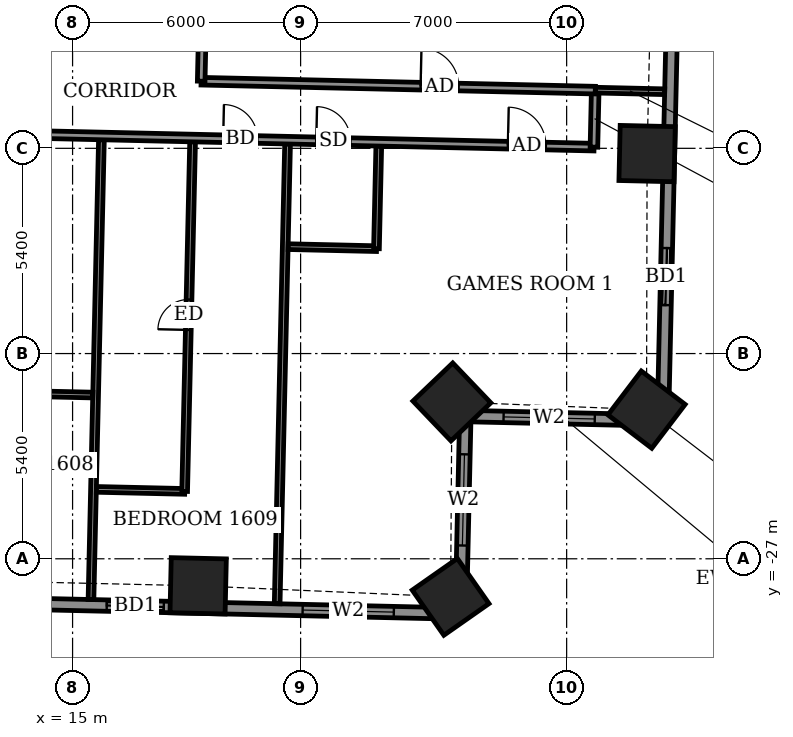
"""IFC4 building model, lengths in metres.
Left out: names, types, materials, properties, quantities, classifications, styles, units other than length and angle.
Written with IfcOpenShell. Run it as: python <this file> out.ifc"""

import sys

from ifc_helpers import new_model, si_unit, direction, frame, frame_2d, origin, origin_2d, place, context, subcontext, project, spatial, rectangle, extrude, element, fill, save


model = new_model("IFC4")
c1 = context("Model", 3, precision=1e-05, world=origin(), true_north=direction((0.0, 1.0)))
c2 = subcontext(c1, "Body", "Model", "MODEL_VIEW")
j1 = project(units=[si_unit("LENGTHUNIT", "METRE"), si_unit("PLANEANGLEUNIT", "RADIAN")], contexts=[c1])
p1 = place(None, origin())
s1 = spatial("IfcSite", under=j1, at=p1, CompositionType="ELEMENT")
p2 = place(p1, origin())
s2 = spatial("IfcBuilding", under=s1, at=p2, CompositionType="ELEMENT")
p3 = place(p2, frame((0.0, 0.0, 67.5)))
s3 = spatial("IfcBuildingStorey", under=s2, at=p3, CompositionType="ELEMENT", Elevation=67.5)
for number, where, z_axis, x_axis in (
    (1, (18.304, -27.711, -0.55), (0.0, 0.0, 1.0), (1.0, -0.023, 0.0)),
    (2, (24.947, -28.002, -0.55), (0.0, 0.0, 1.0), (0.819, 0.574, 0.0)),
    (3, (24.98, -22.873, -0.55), (0.0, 0.0, 1.0), (0.723, 0.691, 0.0)),
    (4, (30.102, -23.076, -0.55), (0.0, 0.0, 1.0), (0.606, 0.796, 0.0)),
    (5, (30.117, -16.339, -0.55), (0.0, 0.0, 1.0), (0.023, 1.0, 0.0)),
):
    element("IfcColumn", number, at=place(p3, frame(where, z_axis=z_axis, x_axis=x_axis)), inside=s3, PredefinedType="COLUMN", context=c2, shape_type="SweptSolid", body=[
        extrude(rectangle(XDim=1.45, YDim=1.45, at=origin_2d()), origin(), (0.0, 0.0, 1.0), 3.6),
    ])
p4 = place(p3, frame((30.533, -23.362, 0.0), z_axis=(0.0, 0.0, 1.0), x_axis=(0.022698800888, 0.999742349027, 0.0)))
e6 = element("IfcWall", 6, at=p4, inside=s3, PredefinedType="SOLIDWALL", context=c2, shape_type="SweptSolid", body=[
    extrude(rectangle(XDim=14.23, YDim=0.3, at=frame_2d((7.115, 0.0))), origin(), (0.0, 0.0, 1.0), 3.05),
])
p5 = place(p4, frame((3.038, 0.0, 0.0)))
e7 = element("IfcOpeningElement", 7, at=p5, cuts=e6, PredefinedType="OPENING", context=c2, shape_type="SweptSolid", body=[
    extrude(rectangle(XDim=1.5, YDim=2.4, at=frame_2d((0.75, 1.2))), frame((0.0, 0.16, 0.0), z_axis=(0.0, -1.0, 0.0), x_axis=(1.0, 0.0, 0.0)), (0.0, 0.0, 1.0), 0.32),
])
p6 = place(p4, frame((9.95, 0.0, 0.9)))
e8 = element("IfcOpeningElement", 8, at=p6, cuts=e6, PredefinedType="OPENING", context=c2, shape_type="SweptSolid", body=[
    extrude(rectangle(XDim=2.4, YDim=1.5, at=frame_2d((1.2, 0.75))), frame((0.0, 0.16, 0.0), z_axis=(0.0, -1.0, 0.0), x_axis=(1.0, 0.0, 0.0)), (0.0, 0.0, 1.0), 0.32),
])
p7 = place(p3, frame((-24.007, -27.326, 0.0), z_axis=(0.0, 0.0, 1.0), x_axis=(0.999742536491, -0.022690542744, 0.0)))
e9 = element("IfcWall", 9, at=p7, inside=s3, PredefinedType="SOLIDWALL", context=c2, shape_type="SweptSolid", body=[
    extrude(rectangle(XDim=49.236, YDim=0.3, at=frame_2d((24.618, 0.0))), origin(), (0.0, 0.0, 1.0), 3.05),
])
p8 = place(p7, frame((1.391, 0.0, 0.0)))
e10 = element("IfcOpeningElement", 10, at=p8, cuts=e9, PredefinedType="OPENING", context=c2, shape_type="SweptSolid", body=[
    extrude(rectangle(XDim=1.2, YDim=2.4, at=frame_2d((0.6, 1.2))), frame((0.0, 0.16, 0.0), z_axis=(0.0, -1.0, 0.0), x_axis=(1.0, 0.0, 0.0)), (0.0, 0.0, 1.0), 0.32),
])
p9 = place(p7, frame((3.901, 0.0, 0.0)))
e11 = element("IfcOpeningElement", 11, at=p9, cuts=e9, PredefinedType="OPENING", context=c2, shape_type="SweptSolid", body=[
    extrude(rectangle(XDim=1.5, YDim=2.4, at=frame_2d((0.75, 1.2))), frame((0.0, 0.16, 0.0), z_axis=(0.0, -1.0, 0.0), x_axis=(1.0, 0.0, 0.0)), (0.0, 0.0, 1.0), 0.32),
])
p10 = place(p7, frame((9.1, 0.0, 0.0)))
e12 = element("IfcOpeningElement", 12, at=p10, cuts=e9, PredefinedType="OPENING", context=c2, shape_type="SweptSolid", body=[
    extrude(rectangle(XDim=1.5, YDim=2.4, at=frame_2d((0.75, 1.2))), frame((0.0, 0.16, 0.0), z_axis=(0.0, -1.0, 0.0), x_axis=(1.0, 0.0, 0.0)), (0.0, 0.0, 1.0), 0.32),
])
p11 = place(p7, frame((14.889, 0.0, 0.0)))
e13 = element("IfcOpeningElement", 13, at=p11, cuts=e9, PredefinedType="OPENING", context=c2, shape_type="SweptSolid", body=[
    extrude(rectangle(XDim=1.5, YDim=2.4, at=frame_2d((0.75, 1.2))), frame((0.0, 0.16, 0.0), z_axis=(0.0, -1.0, 0.0), x_axis=(1.0, 0.0, 0.0)), (0.0, 0.0, 1.0), 0.32),
])
p12 = place(p7, frame((17.952, 0.0, 0.0)))
e14 = element("IfcOpeningElement", 14, at=p12, cuts=e9, PredefinedType="OPENING", context=c2, shape_type="SweptSolid", body=[
    extrude(rectangle(XDim=1.5, YDim=2.4, at=frame_2d((0.75, 1.2))), frame((0.0, 0.16, 0.0), z_axis=(0.0, -1.0, 0.0), x_axis=(1.0, 0.0, 0.0)), (0.0, 0.0, 1.0), 0.32),
])
p13 = place(p7, frame((22.878, 0.0, 0.0)))
e15 = element("IfcOpeningElement", 15, at=p13, cuts=e9, PredefinedType="OPENING", context=c2, shape_type="SweptSolid", body=[
    extrude(rectangle(XDim=1.5, YDim=2.4, at=frame_2d((0.75, 1.2))), frame((0.0, 0.16, 0.0), z_axis=(0.0, -1.0, 0.0), x_axis=(1.0, 0.0, 0.0)), (0.0, 0.0, 1.0), 0.32),
])
p14 = place(p7, frame((26.091, 0.0, 0.0)))
e16 = element("IfcOpeningElement", 16, at=p14, cuts=e9, PredefinedType="OPENING", context=c2, shape_type="SweptSolid", body=[
    extrude(rectangle(XDim=1.2, YDim=2.4, at=frame_2d((0.6, 1.2))), frame((0.0, 0.16, 0.0), z_axis=(0.0, -1.0, 0.0), x_axis=(1.0, 0.0, 0.0)), (0.0, 0.0, 1.0), 0.32),
])
p15 = place(p7, frame((31.754, 0.0, 0.0)))
e17 = element("IfcOpeningElement", 17, at=p15, cuts=e9, PredefinedType="OPENING", context=c2, shape_type="SweptSolid", body=[
    extrude(rectangle(XDim=1.5, YDim=2.4, at=frame_2d((0.75, 1.2))), frame((0.0, 0.16, 0.0), z_axis=(0.0, -1.0, 0.0), x_axis=(1.0, 0.0, 0.0)), (0.0, 0.0, 1.0), 0.32),
])
p16 = place(p7, frame((36.854, 0.0, 0.0)))
e18 = element("IfcOpeningElement", 18, at=p16, cuts=e9, PredefinedType="OPENING", context=c2, shape_type="SweptSolid", body=[
    extrude(rectangle(XDim=1.5, YDim=2.4, at=frame_2d((0.75, 1.2))), frame((0.0, 0.16, 0.0), z_axis=(0.0, -1.0, 0.0), x_axis=(1.0, 0.0, 0.0)), (0.0, 0.0, 1.0), 0.32),
])
p17 = place(p7, frame((39.917, 0.0, 0.0)))
e19 = element("IfcOpeningElement", 19, at=p17, cuts=e9, PredefinedType="OPENING", context=c2, shape_type="SweptSolid", body=[
    extrude(rectangle(XDim=1.5, YDim=2.4, at=frame_2d((0.75, 1.2))), frame((0.0, 0.16, 0.0), z_axis=(0.0, -1.0, 0.0), x_axis=(1.0, 0.0, 0.0)), (0.0, 0.0, 1.0), 0.32),
])
p18 = place(p7, frame((45.072, 0.0, 0.9)))
e20 = element("IfcOpeningElement", 20, at=p18, cuts=e9, PredefinedType="OPENING", context=c2, shape_type="SweptSolid", body=[
    extrude(rectangle(XDim=2.4, YDim=1.5, at=frame_2d((1.2, 0.75))), frame((0.0, 0.16, 0.0), z_axis=(0.0, -1.0, 0.0), x_axis=(1.0, 0.0, 0.0)), (0.0, 0.0, 1.0), 0.32),
])
p19 = place(p3, frame((25.216, -28.443, 0.0), z_axis=(0.0, 0.0, 1.0), x_axis=(0.022674484462, 0.999742900827, 0.0)))
e21 = element("IfcWall", 21, at=p19, inside=s3, PredefinedType="SOLIDWALL", context=c2, shape_type="SweptSolid", body=[
    extrude(rectangle(XDim=5.2, YDim=0.3, at=frame_2d((2.6, 0.0))), origin(), (0.0, 0.0, 1.0), 2.55),
])
p20 = place(p19, frame((1.793, 0.0, 0.9)))
e22 = element("IfcOpeningElement", 22, at=p20, cuts=e21, PredefinedType="OPENING", context=c2, shape_type="SweptSolid", body=[
    extrude(rectangle(XDim=2.4, YDim=1.5, at=frame_2d((1.2, 0.75))), frame((0.0, 0.16, 0.0), z_axis=(0.0, -1.0, 0.0), x_axis=(1.0, 0.0, 0.0)), (0.0, 0.0, 1.0), 0.32),
])
p21 = place(p3, frame((25.334, -23.244, 0.0), z_axis=(0.0, 0.0, 1.0), x_axis=(0.999741811307, -0.022722471786, 0.0)))
e23 = element("IfcWall", 23, at=p21, inside=s3, PredefinedType="SOLIDWALL", context=c2, shape_type="SweptSolid", body=[
    extrude(rectangle(XDim=5.2, YDim=0.3, at=frame_2d((2.6, 0.0))), origin(), (0.0, 0.0, 1.0), 2.55),
])
p22 = place(p21, frame((1.007, 0.0, 0.9)))
e24 = element("IfcOpeningElement", 24, at=p22, cuts=e23, PredefinedType="OPENING", context=c2, shape_type="SweptSolid", body=[
    extrude(rectangle(XDim=2.4, YDim=1.5, at=frame_2d((1.2, 0.75))), frame((0.0, 0.16, 0.0), z_axis=(0.0, -1.0, 0.0), x_axis=(1.0, 0.0, 0.0)), (0.0, 0.0, 1.0), 0.32),
])
p23 = place(p3, frame((15.484, -28.072, 0.0), z_axis=(0.0, 0.0, 1.0), x_axis=(0.02273928012, 0.99974142914, 0.0)))
e25 = element("IfcWall", 25, at=p23, inside=s3, PredefinedType="PARTITIONING", context=c2, shape_type="SweptSolid", body=[
    extrude(rectangle(XDim=12.1, YDim=0.15, at=frame_2d((6.05, 0.0))), origin(), (0.0, 0.0, 1.0), 2.55),
])
p24 = place(p3, frame((20.383, -28.183, 0.0), z_axis=(0.0, 0.0, 1.0), x_axis=(0.022637991173, 0.99974372784, 0.0)))
e26 = element("IfcWall", 26, at=p24, inside=s3, PredefinedType="PARTITIONING", context=c2, shape_type="SweptSolid", body=[
    extrude(rectangle(XDim=12.1, YDim=0.15, at=frame_2d((6.05, 0.0))), origin(), (0.0, 0.0, 1.0), 2.55),
])
p25 = place(p3, frame((15.627, -25.174, 0.0), z_axis=(0.0, 0.0, 1.0), x_axis=(0.999740260747, -0.02279059109, 0.0)))
e27 = element("IfcWall", 27, at=p25, inside=s3, PredefinedType="PARTITIONING", context=c2, shape_type="SweptSolid", body=[
    extrude(rectangle(XDim=2.324, YDim=0.15, at=frame_2d((1.162, 0.0))), origin(), (0.0, 0.0, 1.0), 3.05),
])
p26 = place(p3, frame((17.949, -25.227, 0.0), z_axis=(0.0, 0.0, 1.0), x_axis=(0.02271477479, 0.999741986218, 0.0)))
e28 = element("IfcWall", 28, at=p26, inside=s3, PredefinedType="PARTITIONING", context=c2, shape_type="SweptSolid", body=[
    extrude(rectangle(XDim=9.2, YDim=0.15, at=frame_2d((4.6, 0.0))), origin(), (0.0, 0.0, 1.0), 3.05),
])
p27 = place(p26, frame((4.25, 0.0, 0.0)))
e29 = element("IfcOpeningElement", 29, at=p27, cuts=e28, PredefinedType="OPENING", context=c2, shape_type="SweptSolid", body=[
    extrude(rectangle(XDim=0.8, YDim=2.1, at=frame_2d((0.4, 1.05))), frame((0.0, 0.085, 0.0), z_axis=(0.0, -1.0, 0.0), x_axis=(1.0, 0.0, 0.0)), (0.0, 0.0, 1.0), 0.17),
])
p28 = place(p3, frame((13.209, -22.639, 0.0), z_axis=(0.0, 0.0, 1.0), x_axis=(0.999740260747, -0.02279059109, 0.0)))
e30 = element("IfcWall", 30, at=p28, inside=s3, PredefinedType="PARTITIONING", context=c2, shape_type="SweptSolid", body=[
    extrude(rectangle(XDim=2.324, YDim=0.15, at=frame_2d((1.162, 0.0))), origin(), (0.0, 0.0, 1.0), 3.05),
])
p29 = place(p3, frame((20.673, -18.787, 0.0), z_axis=(0.0, 0.0, 1.0), x_axis=(0.999740478815, -0.022781023197, 0.0)))
e31 = element("IfcWall", 31, at=p29, inside=s3, PredefinedType="PARTITIONING", context=c2, shape_type="SweptSolid", body=[
    extrude(rectangle(XDim=2.325, YDim=0.15, at=frame_2d((1.163, 0.0))), origin(), (0.0, 0.0, 1.0), 3.05),
])
p30 = place(p3, frame((22.996, -18.84, 0.0), z_axis=(0.0, 0.0, 1.0), x_axis=(0.022518033722, 0.999746436932, 0.0)))
e32 = element("IfcWall", 32, at=p30, inside=s3, PredefinedType="PARTITIONING", context=c2, shape_type="SweptSolid", body=[
    extrude(rectangle(XDim=2.7, YDim=0.15, at=frame_2d((1.35, 0.0))), origin(), (0.0, 0.0, 1.0), 3.05),
])
p31 = place(p3, frame((-26.151, -14.924, 0.0), z_axis=(0.0, 0.0, 1.0), x_axis=(0.999742750999, -0.022681089575, 0.0)))
e33 = element("IfcWall", 33, at=p31, inside=s3, PredefinedType="PARTITIONING", context=c2, shape_type="SweptSolid", body=[
    extrude(rectangle(XDim=54.886, YDim=0.2, at=frame_2d((27.443, 0.0))), origin(), (0.0, 0.0, 1.0), 3.05),
])
p32 = place(p31, frame((1.345, 0.0, 0.0)))
e34 = element("IfcOpeningElement", 34, at=p32, cuts=e33, PredefinedType="OPENING", context=c2, shape_type="SweptSolid", body=[
    extrude(rectangle(XDim=1.0, YDim=2.1, at=frame_2d((0.5, 1.05))), frame((0.0, 0.11, 0.0), z_axis=(0.0, -1.0, 0.0), x_axis=(1.0, 0.0, 0.0)), (0.0, 0.0, 1.0), 0.22),
])
p33 = place(p31, frame((8.35, 0.0, 0.0)))
e35 = element("IfcOpeningElement", 35, at=p33, cuts=e33, PredefinedType="OPENING", context=c2, shape_type="SweptSolid", body=[
    extrude(rectangle(XDim=0.9, YDim=2.1, at=frame_2d((0.45, 1.05))), frame((0.0, 0.11, 0.0), z_axis=(0.0, -1.0, 0.0), x_axis=(1.0, 0.0, 0.0)), (0.0, 0.0, 1.0), 0.22),
])
p34 = place(p31, frame((10.625, 0.0, 0.0)))
e36 = element("IfcOpeningElement", 36, at=p34, cuts=e33, PredefinedType="OPENING", context=c2, shape_type="SweptSolid", body=[
    extrude(rectangle(XDim=0.9, YDim=2.1, at=frame_2d((0.45, 1.05))), frame((0.0, 0.11, 0.0), z_axis=(0.0, -1.0, 0.0), x_axis=(1.0, 0.0, 0.0)), (0.0, 0.0, 1.0), 0.22),
])
p35 = place(p31, frame((17.675, 0.0, 0.0)))
e37 = element("IfcOpeningElement", 37, at=p35, cuts=e33, PredefinedType="OPENING", context=c2, shape_type="SweptSolid", body=[
    extrude(rectangle(XDim=0.9, YDim=2.1, at=frame_2d((0.45, 1.05))), frame((0.0, 0.11, 0.0), z_axis=(0.0, -1.0, 0.0), x_axis=(1.0, 0.0, 0.0)), (0.0, 0.0, 1.0), 0.22),
])
p36 = place(p31, frame((19.725, 0.0, 0.0)))
e38 = element("IfcOpeningElement", 38, at=p36, cuts=e33, PredefinedType="OPENING", context=c2, shape_type="SweptSolid", body=[
    extrude(rectangle(XDim=0.9, YDim=2.1, at=frame_2d((0.45, 1.05))), frame((0.0, 0.11, 0.0), z_axis=(0.0, -1.0, 0.0), x_axis=(1.0, 0.0, 0.0)), (0.0, 0.0, 1.0), 0.22),
])
p37 = place(p31, frame((26.575, 0.0, 0.0)))
e39 = element("IfcOpeningElement", 39, at=p37, cuts=e33, PredefinedType="OPENING", context=c2, shape_type="SweptSolid", body=[
    extrude(rectangle(XDim=0.9, YDim=2.1, at=frame_2d((0.45, 1.05))), frame((0.0, 0.11, 0.0), z_axis=(0.0, -1.0, 0.0), x_axis=(1.0, 0.0, 0.0)), (0.0, 0.0, 1.0), 0.22),
])
p38 = place(p31, frame((28.75, 0.0, 0.0)))
e40 = element("IfcOpeningElement", 40, at=p38, cuts=e33, PredefinedType="OPENING", context=c2, shape_type="SweptSolid", body=[
    extrude(rectangle(XDim=0.9, YDim=2.1, at=frame_2d((0.45, 1.05))), frame((0.0, 0.11, 0.0), z_axis=(0.0, -1.0, 0.0), x_axis=(1.0, 0.0, 0.0)), (0.0, 0.0, 1.0), 0.22),
])
p39 = place(p31, frame((35.875, 0.0, 0.0)))
e41 = element("IfcOpeningElement", 41, at=p39, cuts=e33, PredefinedType="OPENING", context=c2, shape_type="SweptSolid", body=[
    extrude(rectangle(XDim=0.9, YDim=2.1, at=frame_2d((0.45, 1.05))), frame((0.0, 0.11, 0.0), z_axis=(0.0, -1.0, 0.0), x_axis=(1.0, 0.0, 0.0)), (0.0, 0.0, 1.0), 0.22),
])
p40 = place(p31, frame((38.1, 0.0, 0.0)))
e42 = element("IfcOpeningElement", 42, at=p40, cuts=e33, PredefinedType="OPENING", context=c2, shape_type="SweptSolid", body=[
    extrude(rectangle(XDim=0.9, YDim=2.1, at=frame_2d((0.45, 1.05))), frame((0.0, 0.11, 0.0), z_axis=(0.0, -1.0, 0.0), x_axis=(1.0, 0.0, 0.0)), (0.0, 0.0, 1.0), 0.22),
])
p41 = place(p31, frame((45.125, 0.0, 0.0)))
e43 = element("IfcOpeningElement", 43, at=p41, cuts=e33, PredefinedType="OPENING", context=c2, shape_type="SweptSolid", body=[
    extrude(rectangle(XDim=0.9, YDim=2.1, at=frame_2d((0.45, 1.05))), frame((0.0, 0.11, 0.0), z_axis=(0.0, -1.0, 0.0), x_axis=(1.0, 0.0, 0.0)), (0.0, 0.0, 1.0), 0.22),
])
p42 = place(p31, frame((52.618, 0.0, 0.0)))
e44 = element("IfcOpeningElement", 44, at=p42, cuts=e33, PredefinedType="OPENING", context=c2, shape_type="SweptSolid", body=[
    extrude(rectangle(XDim=1.0, YDim=2.1, at=frame_2d((0.5, 1.05))), frame((0.0, 0.11, 0.0), z_axis=(0.0, -1.0, 0.0), x_axis=(1.0, 0.0, 0.0)), (0.0, 0.0, 1.0), 0.22),
])
p43 = place(p31, frame((47.575, 0.0, 0.0)))
e45 = element("IfcOpeningElement", 45, at=p43, cuts=e33, PredefinedType="OPENING", context=c2, shape_type="SweptSolid", body=[
    extrude(rectangle(XDim=0.9, YDim=2.1, at=frame_2d((0.45, 1.05))), frame((0.0, 0.11, 0.0), z_axis=(0.0, -1.0, 0.0), x_axis=(1.0, 0.0, 0.0)), (0.0, 0.0, 1.0), 0.22),
])
p44 = place(p3, frame((28.718, -16.169, 0.0), z_axis=(0.0, 0.0, 1.0), x_axis=(0.022617910375, 0.999744182344, 0.0)))
e46 = element("IfcWall", 46, at=p44, inside=s3, PredefinedType="PARTITIONING", context=c2, shape_type="SweptSolid", body=[
    extrude(rectangle(XDim=1.5, YDim=0.2, at=frame_2d((0.75, 0.0))), origin(), (0.0, 0.0, 1.0), 3.05),
])
p45 = place(p3, frame((18.382, -14.434, 0.0), z_axis=(0.0, 0.0, 1.0), x_axis=(0.999743763457, -0.022636418209, 0.0)))
e47 = element("IfcWall", 47, at=p45, inside=s3, PredefinedType="PARTITIONING", context=c2, shape_type="SweptSolid", body=[
    extrude(rectangle(XDim=10.375, YDim=0.2, at=frame_2d((5.188, 0.0))), origin(), (0.0, 0.0, 1.0), 3.05),
])
p46 = place(p45, frame((5.777, 0.0, 0.0)))
e48 = element("IfcOpeningElement", 48, at=p46, cuts=e47, PredefinedType="OPENING", context=c2, shape_type="SweptSolid", body=[
    extrude(rectangle(XDim=1.0, YDim=2.1, at=frame_2d((0.5, 1.05))), frame((0.0, 0.11, 0.0), z_axis=(0.0, -1.0, 0.0), x_axis=(1.0, 0.0, 0.0)), (0.0, 0.0, 1.0), 0.22),
])
p47 = place(p3, frame((18.384, -14.434, 0.0), z_axis=(0.0, 0.0, 1.0), x_axis=(0.022773383809, 0.999740652864, 0.0)))
e49 = element("IfcWall", 49, at=p47, inside=s3, PredefinedType="PARTITIONING", context=c2, shape_type="SweptSolid", body=[
    extrude(rectangle(XDim=6.722, YDim=0.2, at=frame_2d((3.361, 0.0))), origin(), (0.0, 0.0, 1.0), 3.05),
])
p48 = place(p3, frame((28.755, -14.669, 0.0), z_axis=(0.0, 0.0, 1.0), x_axis=(0.999735161806, -0.023013175566, 0.0)))
e50 = element("IfcWall", 50, at=p48, inside=s3, PredefinedType="PARTITIONING", context=c2, shape_type="SweptSolid", body=[
    extrude(rectangle(XDim=1.825, YDim=0.15, at=frame_2d((0.912, 0.0))), origin(), (0.0, 0.0, 1.0), 2.55),
])
p49 = place(p5, origin())
e51 = element("IfcDoor", 51, at=p49, inside=s3, OperationType="SLIDING_TO_LEFT", PredefinedType="DOOR", context=c2, shape_type="SweptSolid", body=[
    extrude(rectangle(XDim=1.5, YDim=2.4, at=frame_2d((0.75, 1.2))), frame((0.0, 0.025, 0.0), z_axis=(0.0, -1.0, 0.0), x_axis=(1.0, 0.0, 0.0)), (0.0, 0.0, 1.0), 0.05),
])
fill(e7, e51)
p50 = place(p17, origin())
e52 = element("IfcDoor", 52, at=p50, inside=s3, OperationType="SLIDING_TO_LEFT", PredefinedType="DOOR", context=c2, shape_type="SweptSolid", body=[
    extrude(rectangle(XDim=1.5, YDim=2.4, at=frame_2d((0.75, 1.2))), frame((0.0, 0.025, 0.0), z_axis=(0.0, -1.0, 0.0), x_axis=(1.0, 0.0, 0.0)), (0.0, 0.0, 1.0), 0.05),
])
fill(e19, e52)
p51 = place(p18, origin())
e53 = element("IfcWindow", 53, at=p51, inside=s3, PartitioningType="DOUBLE_PANEL_VERTICAL", PredefinedType="WINDOW", context=c2, shape_type="SweptSolid", body=[
    extrude(rectangle(XDim=2.4, YDim=1.5, at=frame_2d((1.2, 0.75))), frame((0.0, 0.03, 0.0), z_axis=(0.0, -1.0, 0.0), x_axis=(1.0, 0.0, 0.0)), (0.0, 0.0, 1.0), 0.06),
])
fill(e20, e53)
p52 = place(p20, origin())
e54 = element("IfcWindow", 54, at=p52, inside=s3, PartitioningType="DOUBLE_PANEL_VERTICAL", PredefinedType="WINDOW", context=c2, shape_type="SweptSolid", body=[
    extrude(rectangle(XDim=2.4, YDim=1.5, at=frame_2d((1.2, 0.75))), frame((0.0, 0.03, 0.0), z_axis=(0.0, -1.0, 0.0), x_axis=(1.0, 0.0, 0.0)), (0.0, 0.0, 1.0), 0.06),
])
fill(e22, e54)
p53 = place(p22, origin())
e55 = element("IfcWindow", 55, at=p53, inside=s3, PartitioningType="DOUBLE_PANEL_VERTICAL", PredefinedType="WINDOW", context=c2, shape_type="SweptSolid", body=[
    extrude(rectangle(XDim=2.4, YDim=1.5, at=frame_2d((1.2, 0.75))), frame((0.0, 0.03, 0.0), z_axis=(0.0, -1.0, 0.0), x_axis=(1.0, 0.0, 0.0)), (0.0, 0.0, 1.0), 0.06),
])
fill(e24, e55)
p54 = place(p41, origin())
e56 = element("IfcDoor", 56, at=p54, inside=s3, OperationType="SINGLE_SWING_LEFT", PredefinedType="DOOR", context=c2, shape_type="SweptSolid", body=[
    extrude(rectangle(XDim=0.9, YDim=2.1, at=frame_2d((0.45, 1.05))), frame((0.0, 0.025, 0.0), z_axis=(0.0, -1.0, 0.0), x_axis=(1.0, 0.0, 0.0)), (0.0, 0.0, 1.0), 0.05),
])
fill(e43, e56)
p55 = place(p27, origin())
e57 = element("IfcDoor", 57, at=p55, inside=s3, OperationType="SINGLE_SWING_LEFT", PredefinedType="DOOR", context=c2, shape_type="SweptSolid", body=[
    extrude(rectangle(XDim=0.8, YDim=2.1, at=frame_2d((0.4, 1.05))), frame((0.0, 0.025, 0.0), z_axis=(0.0, -1.0, 0.0), x_axis=(1.0, 0.0, 0.0)), (0.0, 0.0, 1.0), 0.05),
])
fill(e29, e57)
p56 = place(p42, origin())
e58 = element("IfcDoor", 58, at=p56, inside=s3, OperationType="SINGLE_SWING_RIGHT", PredefinedType="DOOR", context=c2, shape_type="SweptSolid", body=[
    extrude(rectangle(XDim=1.0, YDim=2.1, at=frame_2d((0.5, 1.05))), frame((0.0, 0.025, 0.0), z_axis=(0.0, -1.0, 0.0), x_axis=(1.0, 0.0, 0.0)), (0.0, 0.0, 1.0), 0.05),
])
fill(e44, e58)
p57 = place(p43, origin())
e59 = element("IfcDoor", 59, at=p57, inside=s3, OperationType="SINGLE_SWING_LEFT", PredefinedType="DOOR", context=c2, shape_type="SweptSolid", body=[
    extrude(rectangle(XDim=0.9, YDim=2.1, at=frame_2d((0.45, 1.05))), frame((0.0, 0.025, 0.0), z_axis=(0.0, -1.0, 0.0), x_axis=(1.0, 0.0, 0.0)), (0.0, 0.0, 1.0), 0.05),
])
fill(e45, e59)
p58 = place(p46, origin())
e60 = element("IfcDoor", 60, at=p58, inside=s3, OperationType="SINGLE_SWING_LEFT", PredefinedType="DOOR", context=c2, shape_type="SweptSolid", body=[
    extrude(rectangle(XDim=1.0, YDim=2.1, at=frame_2d((0.5, 1.05))), frame((0.0, 0.025, 0.0), z_axis=(0.0, -1.0, 0.0), x_axis=(1.0, 0.0, 0.0)), (0.0, 0.0, 1.0), 0.05),
])
fill(e48, e60)
save(model, sys.argv[1])
